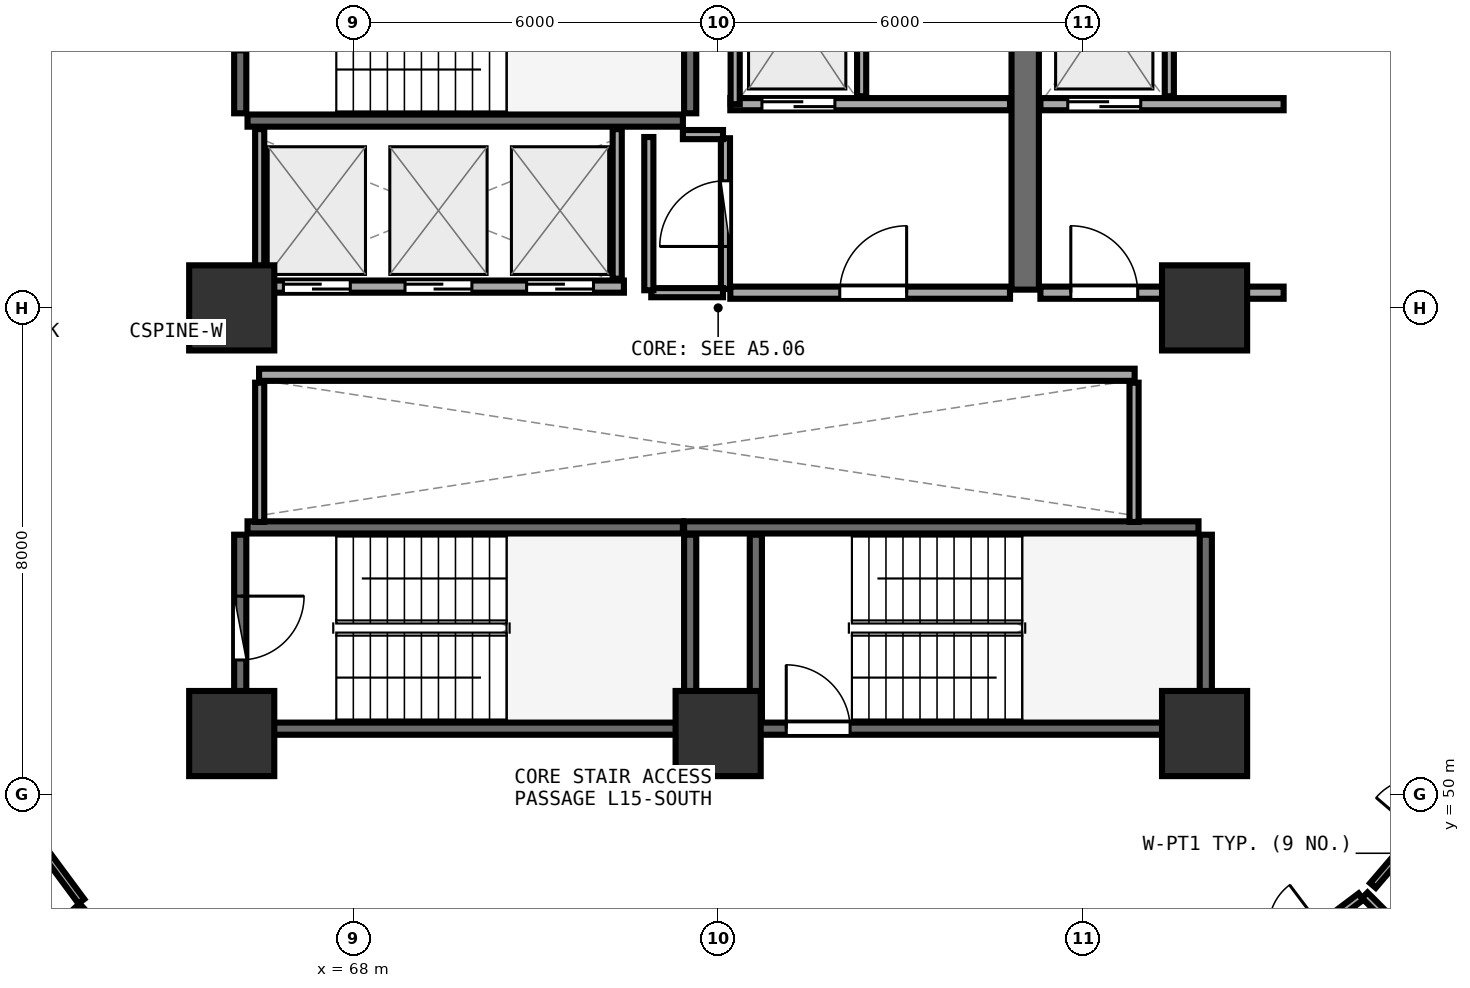
"""IFC4 building model, lengths in metres.
Left out: names, types, materials, properties, quantities, classifications, styles, units other than length and angle.
Written with IfcOpenShell. Run it as: python <this file> out.ifc"""

import sys

from ifc_helpers import new_model, si_unit, direction, frame, frame_2d, origin, origin_2d, place, context, subcontext, project, spatial, rectangle, extrude, element, fill, save


model = new_model("IFC4")
c1 = context("Model", 3, precision=1e-05, world=origin(), true_north=direction((0.0, 1.0)))
c2 = subcontext(c1, "Body", "Model", "MODEL_VIEW")
j1 = project(units=[si_unit("LENGTHUNIT", "METRE"), si_unit("PLANEANGLEUNIT", "RADIAN")], contexts=[c1])
p1 = place(None, origin())
s1 = spatial("IfcSite", under=j1, at=p1, CompositionType="ELEMENT")
p2 = place(p1, origin())
s2 = spatial("IfcBuilding", under=s1, at=p2, CompositionType="ELEMENT")
p3 = place(p2, frame((0.0, 0.0, 60.0)))
s3 = spatial("IfcBuildingStorey", under=s2, at=p3, CompositionType="ELEMENT", Elevation=60.0)
for number, where, z_axis, x_axis in (
    (1, (66.0, 51.0, 0.0), (0.0, 0.0, 1.0), (1.0, 0.0, 0.0)),
    (2, (74.0, 51.0, 0.0), (0.0, 0.0, 1.0), (1.0, 0.0, 0.0)),
    (3, (82.0, 51.0, 0.0), (0.0, 0.0, 1.0), (1.0, 0.0, 0.0)),
    (4, (82.0, 58.0, 0.0), (0.0, 0.0, 1.0), (1.0, 0.0, 0.0)),
    (5, (66.0, 58.0, 0.0), (0.0, 0.0, 1.0), (1.0, 0.0, 0.0)),
):
    element("IfcColumn", number, at=place(p3, frame(where, z_axis=z_axis, x_axis=x_axis)), inside=s3, PredefinedType="PILASTER", context=c2, shape_type="SweptSolid", body=[
        extrude(rectangle(XDim=1.4, YDim=1.4, at=origin_2d()), origin(), (0.0, 0.0, 1.0), 3.75),
    ])
p4 = place(p3, frame((66.26, 61.08, 0.0), z_axis=(0.0, 0.0, 1.0), x_axis=(1.0, 0.0, 0.0)))
e6 = element("IfcWall", 6, at=p4, inside=s3, PredefinedType="SHEAR", context=c2, shape_type="SweptSolid", body=[
    extrude(rectangle(XDim=7.16, YDim=0.2, at=frame_2d((3.58, 0.0))), origin(), (0.0, 0.0, 1.0), 3.49),
])
p5 = place(p3, frame((73.54, 61.2, 0.0), z_axis=(0.0, 0.0, 1.0), x_axis=(0.0, 1.0, 0.0)))
e7 = element("IfcWall", 7, at=p5, inside=s3, PredefinedType="SHEAR", context=c2, shape_type="SweptSolid", body=[
    extrude(rectangle(XDim=3.07, YDim=0.2, at=frame_2d((1.535, 0.0))), origin(), (0.0, 0.0, 1.0), 3.49),
])
p6 = place(p3, frame((66.14, 64.27, 0.0), z_axis=(0.0, 0.0, 1.0), x_axis=(0.0, -1.0, 0.0)))
e8 = element("IfcWall", 8, at=p6, inside=s3, PredefinedType="SHEAR", context=c2, shape_type="SweptSolid", body=[
    extrude(rectangle(XDim=3.07, YDim=0.2, at=frame_2d((1.535, 0.0))), origin(), (0.0, 0.0, 1.0), 3.49),
])
p7 = place(p6, frame((1.01, 0.0, 0.0)))
e9 = element("IfcOpeningElement", 9, at=p7, cuts=e8, PredefinedType="OPENING", context=c2, shape_type="SweptSolid", body=[
    extrude(rectangle(XDim=1.05, YDim=2.1, at=frame_2d((0.525, 1.05))), frame((0.0, 0.11, 0.0), z_axis=(0.0, -1.0, 0.0), x_axis=(1.0, 0.0, 0.0)), (0.0, 0.0, 1.0), 0.22),
])
p8 = place(p3, frame((74.0, 51.08, 0.0), z_axis=(0.0, 0.0, 1.0), x_axis=(1.0, 0.0, 0.0)))
e10 = element("IfcWall", 10, at=p8, inside=s3, PredefinedType="SHEAR", context=c2, shape_type="SweptSolid", body=[
    extrude(rectangle(XDim=7.9, YDim=0.2, at=frame_2d((3.95, 0.0))), origin(), (0.0, 0.0, 1.0), 3.49),
])
p9 = place(p8, frame((1.12, 0.0, 0.0)))
e11 = element("IfcOpeningElement", 11, at=p9, cuts=e10, PredefinedType="OPENING", context=c2, shape_type="SweptSolid", body=[
    extrude(rectangle(XDim=1.05, YDim=2.1, at=frame_2d((0.525, 1.05))), frame((0.0, 0.11, 0.0), z_axis=(0.0, -1.0, 0.0), x_axis=(1.0, 0.0, 0.0)), (0.0, 0.0, 1.0), 0.22),
])
p10 = place(p3, frame((82.02, 51.2, 0.0), z_axis=(0.0, 0.0, 1.0), x_axis=(0.0, 1.0, 0.0)))
e12 = element("IfcWall", 12, at=p10, inside=s3, PredefinedType="SHEAR", context=c2, shape_type="SweptSolid", body=[
    extrude(rectangle(XDim=3.07, YDim=0.2, at=frame_2d((1.535, 0.0))), origin(), (0.0, 0.0, 1.0), 3.49),
])
p11 = place(p3, frame((81.9, 54.39, 0.0), z_axis=(0.0, 0.0, 1.0), x_axis=(-1.0, 0.0, 0.0)))
e13 = element("IfcWall", 13, at=p11, inside=s3, PredefinedType="SHEAR", context=c2, shape_type="SweptSolid", body=[
    extrude(rectangle(XDim=8.46, YDim=0.2, at=frame_2d((4.23, 0.0))), origin(), (0.0, 0.0, 1.0), 3.49),
])
p12 = place(p3, frame((74.62, 54.27, 0.0), z_axis=(0.0, 0.0, 1.0), x_axis=(0.0, -1.0, 0.0)))
e14 = element("IfcWall", 14, at=p12, inside=s3, PredefinedType="SHEAR", context=c2, shape_type="SweptSolid", body=[
    extrude(rectangle(XDim=3.07, YDim=0.2, at=frame_2d((1.535, 0.0))), origin(), (0.0, 0.0, 1.0), 3.49),
])
p13 = place(p3, frame((66.26, 51.08, 0.0), z_axis=(0.0, 0.0, 1.0), x_axis=(1.0, 0.0, 0.0)))
e15 = element("IfcWall", 15, at=p13, inside=s3, PredefinedType="SHEAR", context=c2, shape_type="SweptSolid", body=[
    extrude(rectangle(XDim=7.16, YDim=0.2, at=frame_2d((3.58, 0.0))), origin(), (0.0, 0.0, 1.0), 3.49),
])
p14 = place(p3, frame((73.54, 51.2, 0.0), z_axis=(0.0, 0.0, 1.0), x_axis=(0.0, 1.0, 0.0)))
e16 = element("IfcWall", 16, at=p14, inside=s3, PredefinedType="SHEAR", context=c2, shape_type="SweptSolid", body=[
    extrude(rectangle(XDim=3.07, YDim=0.2, at=frame_2d((1.535, 0.0))), origin(), (0.0, 0.0, 1.0), 3.49),
])
p15 = place(p3, frame((73.42, 54.39, 0.0), z_axis=(0.0, 0.0, 1.0), x_axis=(-1.0, 0.0, 0.0)))
e17 = element("IfcWall", 17, at=p15, inside=s3, PredefinedType="SHEAR", context=c2, shape_type="SweptSolid", body=[
    extrude(rectangle(XDim=7.16, YDim=0.2, at=frame_2d((3.58, 0.0))), origin(), (0.0, 0.0, 1.0), 3.49),
])
p16 = place(p3, frame((66.14, 54.27, 0.0), z_axis=(0.0, 0.0, 1.0), x_axis=(0.0, -1.0, 0.0)))
e18 = element("IfcWall", 18, at=p16, inside=s3, PredefinedType="SHEAR", context=c2, shape_type="SweptSolid", body=[
    extrude(rectangle(XDim=3.07, YDim=0.2, at=frame_2d((1.535, 0.0))), origin(), (0.0, 0.0, 1.0), 3.49),
])
p17 = place(p16, frame((1.01, 0.0, 0.0)))
e19 = element("IfcOpeningElement", 19, at=p17, cuts=e18, PredefinedType="OPENING", context=c2, shape_type="SweptSolid", body=[
    extrude(rectangle(XDim=1.05, YDim=2.1, at=frame_2d((0.525, 1.05))), frame((0.0, 0.11, 0.0), z_axis=(0.0, -1.0, 0.0), x_axis=(1.0, 0.0, 0.0)), (0.0, 0.0, 1.0), 0.22),
])
p18 = place(p3, frame((79.05, 58.3, 0.0), z_axis=(0.0, 0.0, 1.0), x_axis=(0.0, 1.0, 0.0)))
e20 = element("IfcWall", 20, at=p18, inside=s3, PredefinedType="SHEAR", context=c2, shape_type="SweptSolid", body=[
    extrude(rectangle(XDim=6.3, YDim=0.45, at=frame_2d((3.15, 0.0))), origin(), (0.0, 0.0, 1.0), 3.49),
])
p19 = place(p3, frame((74.2, 61.35, 0.0), z_axis=(0.0, 0.0, 1.0), x_axis=(1.0, 0.0, 0.0)))
e21 = element("IfcWall", 21, at=p19, inside=s3, PredefinedType="SOLIDWALL", context=c2, shape_type="SweptSolid", body=[
    extrude(rectangle(XDim=4.6, YDim=0.2, at=frame_2d((2.3, 0.0))), origin(), (0.0, 0.0, 1.0), 3.48),
])
p20 = place(p19, frame((0.52, 0.0, 0.0)))
e22 = element("IfcOpeningElement", 22, at=p20, cuts=e21, PredefinedType="OPENING", context=c2, shape_type="SweptSolid", body=[
    extrude(rectangle(XDim=1.2, YDim=2.15, at=frame_2d((0.6, 1.075))), frame((0.0, 0.11, 0.0), z_axis=(0.0, -1.0, 0.0), x_axis=(1.0, 0.0, 0.0)), (0.0, 0.0, 1.0), 0.22),
])
p21 = place(p3, frame((74.28, 61.35, 0.0), z_axis=(0.0, 0.0, 1.0), x_axis=(0.0, 1.0, 0.0)))
e23 = element("IfcWall", 23, at=p21, inside=s3, PredefinedType="PARTITIONING", context=c2, shape_type="SweptSolid", body=[
    extrude(rectangle(XDim=2.97, YDim=0.15, at=frame_2d((1.485, 0.0))), origin(), (0.0, 0.0, 1.0), 3.48),
])
p22 = place(p3, frame((76.36, 61.48, 0.0), z_axis=(0.0, 0.0, 1.0), x_axis=(0.0, 1.0, 0.0)))
e24 = element("IfcWall", 24, at=p22, inside=s3, PredefinedType="PARTITIONING", context=c2, shape_type="SweptSolid", body=[
    extrude(rectangle(XDim=2.84, YDim=0.15, at=frame_2d((1.42, 0.0))), origin(), (0.0, 0.0, 1.0), 3.48),
])
p23 = place(p3, frame((79.3, 61.35, 0.0), z_axis=(0.0, 0.0, 1.0), x_axis=(1.0, 0.0, 0.0)))
e25 = element("IfcWall", 25, at=p23, inside=s3, PredefinedType="SOLIDWALL", context=c2, shape_type="SweptSolid", body=[
    extrude(rectangle(XDim=4.0, YDim=0.2, at=frame_2d((2.0, 0.0))), origin(), (0.0, 0.0, 1.0), 2.775),
])
p24 = place(p23, frame((0.45, 0.0, 0.0)))
e26 = element("IfcOpeningElement", 26, at=p24, cuts=e25, PredefinedType="OPENING", context=c2, shape_type="SweptSolid", body=[
    extrude(rectangle(XDim=1.2, YDim=2.15, at=frame_2d((0.6, 1.075))), frame((0.0, 0.11, 0.0), z_axis=(0.0, -1.0, 0.0), x_axis=(1.0, 0.0, 0.0)), (0.0, 0.0, 1.0), 0.22),
])
p25 = place(p3, frame((81.42, 61.48, 0.0), z_axis=(0.0, 0.0, 1.0), x_axis=(0.0, 1.0, 0.0)))
e27 = element("IfcWall", 27, at=p25, inside=s3, PredefinedType="PARTITIONING", context=c2, shape_type="SweptSolid", body=[
    extrude(rectangle(XDim=2.84, YDim=0.15, at=frame_2d((1.42, 0.0))), origin(), (0.0, 0.0, 1.0), 3.48),
])
p26 = place(p3, frame((74.2, 58.25, 0.0), z_axis=(0.0, 0.0, 1.0), x_axis=(1.0, 0.0, 0.0)))
e28 = element("IfcWall", 28, at=p26, inside=s3, PredefinedType="SOLIDWALL", context=c2, shape_type="SweptSolid", body=[
    extrude(rectangle(XDim=4.6, YDim=0.2, at=frame_2d((2.3, 0.0))), origin(), (0.0, 0.0, 1.0), 3.48),
])
p27 = place(p26, frame((1.8, 0.0, 0.0)))
e29 = element("IfcOpeningElement", 29, at=p27, cuts=e28, PredefinedType="OPENING", context=c2, shape_type="SweptSolid", body=[
    extrude(rectangle(XDim=1.1, YDim=2.1, at=frame_2d((0.55, 1.05))), frame((0.0, 0.11, 0.0), z_axis=(0.0, -1.0, 0.0), x_axis=(1.0, 0.0, 0.0)), (0.0, 0.0, 1.0), 0.22),
])
p28 = place(p3, frame((79.3, 58.25, 0.0), z_axis=(0.0, 0.0, 1.0), x_axis=(1.0, 0.0, 0.0)))
e30 = element("IfcWall", 30, at=p28, inside=s3, PredefinedType="SOLIDWALL", context=c2, shape_type="SweptSolid", body=[
    extrude(rectangle(XDim=4.0, YDim=0.2, at=frame_2d((2.0, 0.0))), origin(), (0.0, 0.0, 1.0), 2.775),
])
p29 = place(p28, frame((0.5, 0.0, 0.0)))
e31 = element("IfcOpeningElement", 31, at=p29, cuts=e30, PredefinedType="OPENING", context=c2, shape_type="SweptSolid", body=[
    extrude(rectangle(XDim=1.1, YDim=2.1, at=frame_2d((0.55, 1.05))), frame((0.0, 0.11, 0.0), z_axis=(0.0, -1.0, 0.0), x_axis=(1.0, 0.0, 0.0)), (0.0, 0.0, 1.0), 0.22),
])
p30 = place(p3, frame((66.45, 58.35, 0.0), z_axis=(0.0, 0.0, 1.0), x_axis=(1.0, 0.0, 0.0)))
e32 = element("IfcWall", 32, at=p30, inside=s3, PredefinedType="SOLIDWALL", context=c2, shape_type="SweptSolid", body=[
    extrude(rectangle(XDim=6.0, YDim=0.2, at=frame_2d((3.0, 0.0))), origin(), (0.0, 0.0, 1.0), 3.48),
])
p31 = place(p30, frame((0.4, 0.0, 0.0)))
e33 = element("IfcOpeningElement", 33, at=p31, cuts=e32, PredefinedType="OPENING", context=c2, shape_type="SweptSolid", body=[
    extrude(rectangle(XDim=1.1, YDim=2.1, at=frame_2d((0.55, 1.05))), frame((0.0, 0.11, 0.0), z_axis=(0.0, -1.0, 0.0), x_axis=(1.0, 0.0, 0.0)), (0.0, 0.0, 1.0), 0.22),
])
p32 = place(p30, frame((2.4, 0.0, 0.0)))
e34 = element("IfcOpeningElement", 34, at=p32, cuts=e32, PredefinedType="OPENING", context=c2, shape_type="SweptSolid", body=[
    extrude(rectangle(XDim=1.1, YDim=2.1, at=frame_2d((0.55, 1.05))), frame((0.0, 0.11, 0.0), z_axis=(0.0, -1.0, 0.0), x_axis=(1.0, 0.0, 0.0)), (0.0, 0.0, 1.0), 0.22),
])
p33 = place(p30, frame((4.4, 0.0, 0.0)))
e35 = element("IfcOpeningElement", 35, at=p33, cuts=e32, PredefinedType="OPENING", context=c2, shape_type="SweptSolid", body=[
    extrude(rectangle(XDim=1.1, YDim=2.1, at=frame_2d((0.55, 1.05))), frame((0.0, 0.11, 0.0), z_axis=(0.0, -1.0, 0.0), x_axis=(1.0, 0.0, 0.0)), (0.0, 0.0, 1.0), 0.22),
])
for number, where, z_axis, x_axis in (
    (36, (66.46, 58.48, 0.0), (0.0, 0.0, 1.0), (0.0, 1.0, 0.0)),
    (37, (72.34, 58.48, 0.0), (0.0, 0.0, 1.0), (0.0, 1.0, 0.0)),
):
    element("IfcWall", number, at=place(p3, frame(where, z_axis=z_axis, x_axis=x_axis)), inside=s3, PredefinedType="PARTITIONING", context=c2, shape_type="SweptSolid", body=[
        extrude(rectangle(XDim=2.46, YDim=0.15, at=frame_2d((1.23, 0.0))), origin(), (0.0, 0.0, 1.0), 3.48),
    ])
p34 = place(p3, frame((66.45, 56.9, 0.0), z_axis=(0.0, 0.0, 1.0), x_axis=(1.0, 0.0, 0.0)))
e38 = element("IfcWall", 38, at=p34, inside=s3, PredefinedType="SOLIDWALL", context=c2, shape_type="SweptSolid", body=[
    extrude(rectangle(XDim=14.4, YDim=0.2, at=frame_2d((7.2, 0.0))), origin(), (0.0, 0.0, 1.0), 3.48),
])
for number, where, z_axis, x_axis in (
    (39, (66.46, 54.48, 0.0), (0.0, 0.0, 1.0), (0.0, 1.0, 0.0)),
    (40, (80.84, 54.48, 0.0), (0.0, 0.0, 1.0), (0.0, 1.0, 0.0)),
):
    element("IfcWall", number, at=place(p3, frame(where, z_axis=z_axis, x_axis=x_axis)), inside=s3, PredefinedType="PARTITIONING", context=c2, shape_type="SweptSolid", body=[
        extrude(rectangle(XDim=2.29, YDim=0.15, at=frame_2d((1.145, 0.0))), origin(), (0.0, 0.0, 1.0), 3.48),
    ])
p35 = place(p3, frame((74.12, 58.31, 0.0), z_axis=(0.0, 0.0, 1.0), x_axis=(0.0, 1.0, 0.0)))
e41 = element("IfcWall", 41, at=p35, inside=s3, PredefinedType="PARTITIONING", context=c2, shape_type="SweptSolid", body=[
    extrude(rectangle(XDim=2.48, YDim=0.15, at=frame_2d((1.24, 0.0))), origin(), (0.0, 0.0, 1.0), 3.48),
])
p36 = place(p35, frame((0.7, 0.0, 0.0)))
e42 = element("IfcOpeningElement", 42, at=p36, cuts=e41, PredefinedType="OPENING", context=c2, shape_type="SweptSolid", body=[
    extrude(rectangle(XDim=1.08, YDim=2.1, at=frame_2d((0.54, 1.05))), frame((0.0, 0.085, 0.0), z_axis=(0.0, -1.0, 0.0), x_axis=(1.0, 0.0, 0.0)), (0.0, 0.0, 1.0), 0.17),
])
p37 = place(p3, frame((60.071, 52.912, 0.0), z_axis=(0.0, 0.0, 1.0), x_axis=(0.594763174801, -0.80390096772, 0.0)))
e43 = element("IfcWall", 43, at=p37, inside=s3, PredefinedType="PARTITIONING", context=c2, shape_type="SweptSolid", body=[
    extrude(rectangle(XDim=5.81, YDim=0.12, at=frame_2d((2.905, 0.0))), origin(), (0.0, 0.0, 1.0), 2.875),
])
p38 = place(p37, frame((2.455, 0.0, 0.0)))
e44 = element("IfcOpeningElement", 44, at=p38, cuts=e43, PredefinedType="OPENING", context=c2, shape_type="SweptSolid", body=[
    extrude(rectangle(XDim=0.9, YDim=2.08, at=frame_2d((0.45, 1.04))), frame((0.0, 0.07, 0.0), z_axis=(0.0, -1.0, 0.0), x_axis=(1.0, 0.0, 0.0)), (0.0, 0.0, 1.0), 0.14),
])
p39 = place(p3, frame((82.573, 46.811, 0.0), z_axis=(0.0, 0.0, 1.0), x_axis=(0.7983589592, 0.602181843188, 0.0)))
e45 = element("IfcWall", 45, at=p39, inside=s3, PredefinedType="PLUMBINGWALL", context=c2, shape_type="SweptSolid", body=[
    extrude(rectangle(XDim=2.504, YDim=0.13, at=frame_2d((1.252, 0.0))), origin(), (0.0, 0.0, 1.0), 2.875),
])
p40 = place(p39, frame((0.822, 0.0, 0.0)))
e46 = element("IfcOpeningElement", 46, at=p40, cuts=e45, PredefinedType="OPENING", context=c2, shape_type="SweptSolid", body=[
    extrude(rectangle(XDim=0.86, YDim=2.05, at=frame_2d((0.43, 1.025))), frame((0.0, 0.075, 0.0), z_axis=(0.0, -1.0, 0.0), x_axis=(1.0, 0.0, 0.0)), (0.0, 0.0, 1.0), 0.15),
])
p41 = place(p3, frame((84.769, 48.502, 0.0), z_axis=(0.0, 0.0, 1.0), x_axis=(0.649870238328, 0.760045178483, 0.0)))
e47 = element("IfcWall", 47, at=p41, inside=s3, PredefinedType="PARTITIONING", context=c2, shape_type="SweptSolid", body=[
    extrude(rectangle(XDim=3.167, YDim=0.12, at=frame_2d((1.583, 0.0))), origin(), (0.0, 0.0, 1.0), 2.875),
])
p42 = place(p41, frame((1.133, 0.0, 0.0)))
e48 = element("IfcOpeningElement", 48, at=p42, cuts=e47, PredefinedType="OPENING", context=c2, shape_type="SweptSolid", body=[
    extrude(rectangle(XDim=0.9, YDim=2.08, at=frame_2d((0.45, 1.04))), frame((0.0, 0.07, 0.0), z_axis=(0.0, -1.0, 0.0), x_axis=(1.0, 0.0, 0.0)), (0.0, 0.0, 1.0), 0.14),
])
p43 = place(p3, frame((72.9, 58.25, 0.0), z_axis=(0.0, 0.0, 1.0), x_axis=(1.0, 0.0, 0.0)))
e49 = element("IfcWall", 49, at=p43, inside=s3, PredefinedType="PARTITIONING", context=c2, shape_type="SweptSolid", body=[
    extrude(rectangle(XDim=1.18, YDim=0.15, at=frame_2d((0.59, 0.0))), origin(), (0.0, 0.0, 1.0), 3.48),
])
p44 = place(p3, frame((74.08, 60.85, 0.0), z_axis=(0.0, 0.0, 1.0), x_axis=(-1.0, 0.0, 0.0)))
e50 = element("IfcWall", 50, at=p44, inside=s3, PredefinedType="PARTITIONING", context=c2, shape_type="SweptSolid", body=[
    extrude(rectangle(XDim=0.66, YDim=0.15, at=frame_2d((0.33, 0.0))), origin(), (0.0, 0.0, 1.0), 3.48),
])
p45 = place(p3, frame((72.86, 60.81, 0.0), z_axis=(0.0, 0.0, 1.0), x_axis=(0.0, -1.0, 0.0)))
e51 = element("IfcWall", 51, at=p45, inside=s3, PredefinedType="PARTITIONING", context=c2, shape_type="SweptSolid", body=[
    extrude(rectangle(XDim=2.52, YDim=0.15, at=frame_2d((1.26, 0.0))), origin(), (0.0, 0.0, 1.0), 3.48),
])
p46 = place(p3, frame((63.532, 48.166, 0.0), z_axis=(0.0, 0.0, 1.0), x_axis=(-0.742191353367, -0.670188029577, 0.0)))
e52 = element("IfcWall", 52, at=p46, inside=s3, PredefinedType="PARTITIONING", context=c2, shape_type="SweptSolid", body=[
    extrude(rectangle(XDim=11.569, YDim=0.1, at=frame_2d((5.785, 0.0))), origin(), (0.0, 0.0, 1.0), 2.875),
])
p47 = place(p3, frame((84.634, 48.341, 0.0), z_axis=(0.0, 0.0, 1.0), x_axis=(0.706525219412, -0.707687865047, 0.0)))
e53 = element("IfcWall", 53, at=p47, inside=s3, PredefinedType="PLUMBINGWALL", context=c2, shape_type="SweptSolid", body=[
    extrude(rectangle(XDim=3.36, YDim=0.13, at=frame_2d((1.68, 0.0))), origin(), (0.0, 0.0, 1.0), 3.235),
])
p48 = place(p9, origin())
e54 = element("IfcDoor", 54, at=p48, inside=s3, OperationType="SINGLE_SWING_LEFT", PredefinedType="DOOR", context=c2, shape_type="SweptSolid", body=[
    extrude(rectangle(XDim=1.05, YDim=2.1, at=frame_2d((0.525, 1.05))), frame((0.0, 0.025, 0.0), z_axis=(0.0, -1.0, 0.0), x_axis=(1.0, 0.0, 0.0)), (0.0, 0.0, 1.0), 0.05),
])
fill(e11, e54)
p49 = place(p17, origin())
e55 = element("IfcDoor", 55, at=p49, inside=s3, OperationType="SINGLE_SWING_LEFT", PredefinedType="DOOR", context=c2, shape_type="SweptSolid", body=[
    extrude(rectangle(XDim=1.05, YDim=2.1, at=frame_2d((0.525, 1.05))), frame((0.0, 0.025, 0.0), z_axis=(0.0, -1.0, 0.0), x_axis=(1.0, 0.0, 0.0)), (0.0, 0.0, 1.0), 0.05),
])
fill(e19, e55)
p50 = place(p20, origin())
e56 = element("IfcDoor", 56, at=p50, inside=s3, OperationType="DOUBLE_DOOR_SLIDING", PredefinedType="DOOR", context=c2, shape_type="SweptSolid", body=[
    extrude(rectangle(XDim=1.2, YDim=2.15, at=frame_2d((0.6, 1.075))), frame((0.0, 0.025, 0.0), z_axis=(0.0, -1.0, 0.0), x_axis=(1.0, 0.0, 0.0)), (0.0, 0.0, 1.0), 0.05),
])
fill(e22, e56)
p51 = place(p24, origin())
e57 = element("IfcDoor", 57, at=p51, inside=s3, OperationType="DOUBLE_DOOR_SLIDING", PredefinedType="DOOR", context=c2, shape_type="SweptSolid", body=[
    extrude(rectangle(XDim=1.2, YDim=2.15, at=frame_2d((0.6, 1.075))), frame((0.0, 0.025, 0.0), z_axis=(0.0, -1.0, 0.0), x_axis=(1.0, 0.0, 0.0)), (0.0, 0.0, 1.0), 0.05),
])
fill(e26, e57)
p52 = place(p27, frame((1.1, 0.0, 0.0), z_axis=(0.0, 0.0, 1.0), x_axis=(-1.0, 0.0, 0.0)))
e58 = element("IfcDoor", 58, at=p52, inside=s3, OperationType="SINGLE_SWING_LEFT", PredefinedType="DOOR", context=c2, shape_type="SweptSolid", body=[
    extrude(rectangle(XDim=1.1, YDim=2.1, at=frame_2d((0.55, 1.05))), frame((0.0, 0.025, 0.0), z_axis=(0.0, -1.0, 0.0), x_axis=(1.0, 0.0, 0.0)), (0.0, 0.0, 1.0), 0.05),
])
fill(e29, e58)
p53 = place(p29, frame((1.1, 0.0, 0.0), z_axis=(0.0, 0.0, 1.0), x_axis=(-1.0, 0.0, 0.0)))
e59 = element("IfcDoor", 59, at=p53, inside=s3, OperationType="SINGLE_SWING_RIGHT", PredefinedType="DOOR", context=c2, shape_type="SweptSolid", body=[
    extrude(rectangle(XDim=1.1, YDim=2.1, at=frame_2d((0.55, 1.05))), frame((0.0, 0.025, 0.0), z_axis=(0.0, -1.0, 0.0), x_axis=(1.0, 0.0, 0.0)), (0.0, 0.0, 1.0), 0.05),
])
fill(e31, e59)
p54 = place(p31, origin())
e60 = element("IfcDoor", 60, at=p54, inside=s3, OperationType="DOUBLE_DOOR_SLIDING", PredefinedType="DOOR", context=c2, shape_type="SweptSolid", body=[
    extrude(rectangle(XDim=1.1, YDim=2.1, at=frame_2d((0.55, 1.05))), frame((0.0, 0.025, 0.0), z_axis=(0.0, -1.0, 0.0), x_axis=(1.0, 0.0, 0.0)), (0.0, 0.0, 1.0), 0.05),
])
fill(e33, e60)
p55 = place(p32, origin())
e61 = element("IfcDoor", 61, at=p55, inside=s3, OperationType="DOUBLE_DOOR_SLIDING", PredefinedType="DOOR", context=c2, shape_type="SweptSolid", body=[
    extrude(rectangle(XDim=1.1, YDim=2.1, at=frame_2d((0.55, 1.05))), frame((0.0, 0.025, 0.0), z_axis=(0.0, -1.0, 0.0), x_axis=(1.0, 0.0, 0.0)), (0.0, 0.0, 1.0), 0.05),
])
fill(e34, e61)
p56 = place(p33, origin())
e62 = element("IfcDoor", 62, at=p56, inside=s3, OperationType="DOUBLE_DOOR_SLIDING", PredefinedType="DOOR", context=c2, shape_type="SweptSolid", body=[
    extrude(rectangle(XDim=1.1, YDim=2.1, at=frame_2d((0.55, 1.05))), frame((0.0, 0.025, 0.0), z_axis=(0.0, -1.0, 0.0), x_axis=(1.0, 0.0, 0.0)), (0.0, 0.0, 1.0), 0.05),
])
fill(e35, e62)
p57 = place(p36, origin())
e63 = element("IfcDoor", 63, at=p57, inside=s3, OperationType="SINGLE_SWING_LEFT", PredefinedType="DOOR", context=c2, shape_type="SweptSolid", body=[
    extrude(rectangle(XDim=1.08, YDim=2.1, at=frame_2d((0.54, 1.05))), frame((0.0, 0.025, 0.0), z_axis=(0.0, -1.0, 0.0), x_axis=(1.0, 0.0, 0.0)), (0.0, 0.0, 1.0), 0.05),
])
fill(e42, e63)
save(model, sys.argv[1])
